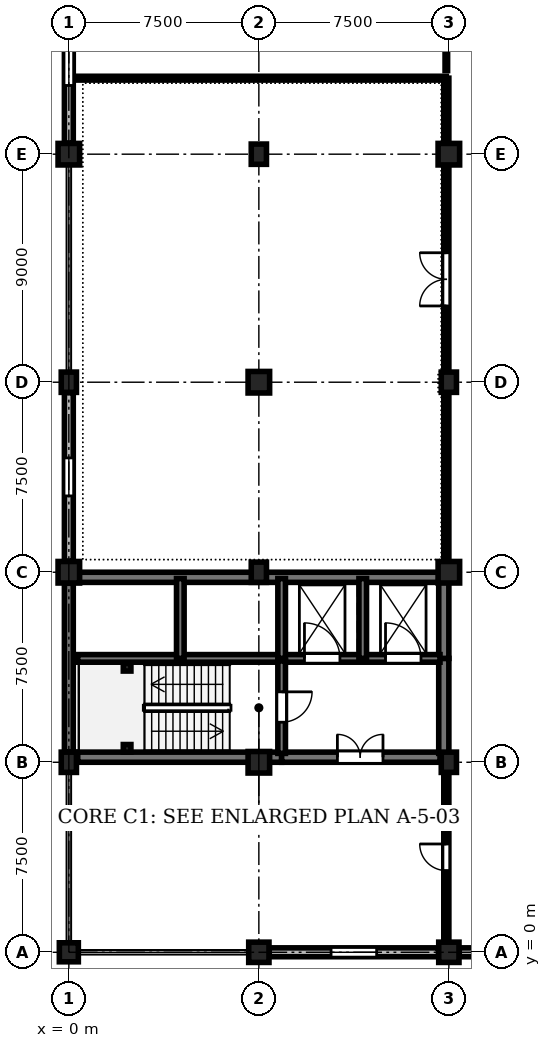
"""IFC4 building model, lengths in metres.
Left out: names, types, materials, properties, quantities, classifications, styles, units other than length and angle.
Written with IfcOpenShell. Run it as: python <this file> out.ifc"""

import sys

from ifc_helpers import new_model, si_unit, direction, frame, frame_2d, origin, origin_with_axes, origin_2d, place, context, subcontext, project, spatial, rectangle, circle, i_section, extrude, element, fill, save


model = new_model("IFC4")
c1 = context("Model", 3, precision=1e-05, world=origin(), true_north=direction((0.0, 1.0)))
c2 = subcontext(c1, "Body", "Model", "MODEL_VIEW")
j1 = project(units=[si_unit("LENGTHUNIT", "METRE"), si_unit("PLANEANGLEUNIT", "RADIAN")], contexts=[c1])
p1 = place(None, origin())
s1 = spatial("IfcSite", under=j1, at=p1, CompositionType="ELEMENT")
p2 = place(p1, origin())
s2 = spatial("IfcBuilding", under=s1, at=p2, CompositionType="ELEMENT")
p3 = place(p2, frame((0.0, 0.0, 4.8)))
s3 = spatial("IfcBuildingStorey", under=s2, at=p3, CompositionType="ELEMENT", Elevation=4.8)
p4 = place(p3, origin_with_axes())
e1 = element("IfcColumn", 1, at=p4, inside=s3, PredefinedType="COLUMN", context=c2, shape_type="SweptSolid", body=[
    extrude(circle(Radius=0.375, at=origin_2d()), origin(), (0.0, 0.0, 1.0), 4.5),
])
p5 = place(p3, frame((0.0, 7.5, 0.0), z_axis=(0.0, 0.0, 1.0), x_axis=(1.0, 0.0, 0.0)))
e2 = element("IfcColumn", 2, at=p5, inside=s3, PredefinedType="COLUMN", context=c2, shape_type="SweptSolid", body=[
    extrude(rectangle(XDim=0.6, YDim=0.8, at=origin_2d()), origin(), (0.0, 0.0, 1.0), 4.5),
])
p6 = place(p3, frame((0.0, 15.0, 0.0), z_axis=(0.0, 0.0, 1.0), x_axis=(1.0, 0.0, 0.0)))
e3 = element("IfcColumn", 3, at=p6, inside=s3, PredefinedType="COLUMN", context=c2, shape_type="SweptSolid", body=[
    extrude(rectangle(XDim=0.85, YDim=0.85, at=origin_2d()), origin(), (0.0, 0.0, 1.0), 4.5),
])
p7 = place(p3, frame((0.0, 22.5, 0.0), z_axis=(0.0, 0.0, 1.0), x_axis=(1.0, 0.0, 0.0)))
e4 = element("IfcColumn", 4, at=p7, inside=s3, PredefinedType="COLUMN", context=c2, shape_type="SweptSolid", body=[
    extrude(rectangle(XDim=0.6, YDim=0.8, at=origin_2d()), origin(), (0.0, 0.0, 1.0), 4.5),
])
p8 = place(p3, frame((0.0, 31.5, 0.0), z_axis=(0.0, 0.0, 1.0), x_axis=(1.0, 0.0, 0.0)))
e5 = element("IfcColumn", 5, at=p8, inside=s3, PredefinedType="COLUMN", context=c2, shape_type="SweptSolid", body=[
    extrude(rectangle(XDim=0.85, YDim=0.85, at=origin_2d()), origin(), (0.0, 0.0, 1.0), 4.5),
])
p9 = place(p3, frame((7.5, 0.0, 0.0), z_axis=(0.0, 0.0, 1.0), x_axis=(1.0, 0.0, 0.0)))
e6 = element("IfcColumn", 6, at=p9, inside=s3, PredefinedType="COLUMN", context=c2, shape_type="SweptSolid", body=[
    extrude(rectangle(XDim=0.8, YDim=0.8, at=origin_2d()), origin(), (0.0, 0.0, 1.0), 4.5),
])
p10 = place(p3, frame((7.5, 7.5, 0.0), z_axis=(0.0, 0.0, 1.0), x_axis=(1.0, 0.0, 0.0)))
e7 = element("IfcColumn", 7, at=p10, inside=s3, PredefinedType="COLUMN", context=c2, shape_type="SweptSolid", body=[
    extrude(rectangle(XDim=0.85, YDim=0.85, at=origin_2d()), origin(), (0.0, 0.0, 1.0), 4.5),
])
p11 = place(p3, frame((7.5, 15.0, 0.0), z_axis=(0.0, 0.0, 1.0), x_axis=(1.0, 0.0, 0.0)))
e8 = element("IfcColumn", 8, at=p11, inside=s3, PredefinedType="COLUMN", context=c2, shape_type="SweptSolid", body=[
    extrude(rectangle(XDim=0.6, YDim=0.8, at=origin_2d()), origin(), (0.0, 0.0, 1.0), 4.5),
])
p12 = place(p3, frame((7.5, 22.5, 0.0), z_axis=(0.0, 0.0, 1.0), x_axis=(1.0, 0.0, 0.0)))
e9 = element("IfcColumn", 9, at=p12, inside=s3, PredefinedType="COLUMN", context=c2, shape_type="SweptSolid", body=[
    extrude(rectangle(XDim=0.85, YDim=0.85, at=origin_2d()), origin(), (0.0, 0.0, 1.0), 4.5),
])
p13 = place(p3, frame((7.5, 31.5, 0.0), z_axis=(0.0, 0.0, 1.0), x_axis=(1.0, 0.0, 0.0)))
e10 = element("IfcColumn", 10, at=p13, inside=s3, PredefinedType="COLUMN", context=c2, shape_type="SweptSolid", body=[
    extrude(rectangle(XDim=0.6, YDim=0.8, at=origin_2d()), origin(), (0.0, 0.0, 1.0), 4.5),
])
p14 = place(p3, frame((15.0, 0.0, 0.0), z_axis=(0.0, 0.0, 1.0), x_axis=(1.0, 0.0, 0.0)))
e11 = element("IfcColumn", 11, at=p14, inside=s3, PredefinedType="COLUMN", context=c2, shape_type="SweptSolid", body=[
    extrude(rectangle(XDim=0.8, YDim=0.8, at=origin_2d()), origin(), (0.0, 0.0, 1.0), 4.5),
])
p15 = place(p3, frame((15.0, 7.5, 0.0), z_axis=(0.0, 0.0, 1.0), x_axis=(1.0, 0.0, 0.0)))
e12 = element("IfcColumn", 12, at=p15, inside=s3, PredefinedType="COLUMN", context=c2, shape_type="SweptSolid", body=[
    extrude(rectangle(XDim=0.6, YDim=0.8, at=origin_2d()), origin(), (0.0, 0.0, 1.0), 4.5),
])
p16 = place(p3, frame((15.0, 15.0, 0.0), z_axis=(0.0, 0.0, 1.0), x_axis=(1.0, 0.0, 0.0)))
e13 = element("IfcColumn", 13, at=p16, inside=s3, PredefinedType="COLUMN", context=c2, shape_type="SweptSolid", body=[
    extrude(rectangle(XDim=0.85, YDim=0.85, at=origin_2d()), origin(), (0.0, 0.0, 1.0), 4.5),
])
p17 = place(p3, frame((15.0, 22.5, 0.0), z_axis=(0.0, 0.0, 1.0), x_axis=(1.0, 0.0, 0.0)))
e14 = element("IfcColumn", 14, at=p17, inside=s3, PredefinedType="COLUMN", context=c2, shape_type="SweptSolid", body=[
    extrude(rectangle(XDim=0.6, YDim=0.8, at=origin_2d()), origin(), (0.0, 0.0, 1.0), 4.5),
])
p18 = place(p3, frame((15.0, 31.5, 0.0), z_axis=(0.0, 0.0, 1.0), x_axis=(1.0, 0.0, 0.0)))
e15 = element("IfcColumn", 15, at=p18, inside=s3, PredefinedType="COLUMN", context=c2, shape_type="SweptSolid", body=[
    extrude(rectangle(XDim=0.85, YDim=0.85, at=origin_2d()), origin(), (0.0, 0.0, 1.0), 4.5),
])
for number, where, z_axis, x_axis in (
    (16, (2.3, 8.05, 0.0), (0.0, 0.0, 1.0), (1.0, 0.0, 0.0)),
    (17, (2.3, 11.25, 0.0), (0.0, 0.0, 1.0), (1.0, 0.0, 0.0)),
):
    element("IfcColumn", number, at=place(p3, frame(where, z_axis=z_axis, x_axis=x_axis)), inside=s3, PredefinedType="COLUMN", context=c2, shape_type="SweptSolid", body=[
        extrude(i_section(OverallWidth=0.3, OverallDepth=0.3, WebThickness=0.011, FlangeThickness=0.019, FilletRadius=0.027, at=origin_2d()), origin(), (0.0, 0.0, 1.0), 4.5),
    ])
p19 = place(p3, frame((0.0, 7.91, 0.0), z_axis=(0.0, 0.0, 1.0), x_axis=(0.0, 1.0, 0.0)))
e18 = element("IfcWall", 18, at=p19, inside=s3, PredefinedType="SHEAR", context=c2, shape_type="SweptSolid", body=[
    extrude(rectangle(XDim=6.655, YDim=0.35, at=frame_2d((3.328, 0.0))), origin(), (0.0, 0.0, 1.0), 4.18),
])
p20 = place(p3, frame((0.0, 15.435, 0.0), z_axis=(0.0, 0.0, 1.0), x_axis=(0.0, 1.0, 0.0)))
e19 = element("IfcWall", 19, at=p20, inside=s3, PredefinedType="STANDARD", context=c2, shape_type="SweptSolid", body=[
    extrude(rectangle(XDim=6.655, YDim=0.35, at=frame_2d((3.328, 0.0))), origin(), (0.0, 0.0, 1.0), 3.63),
])
p21 = place(p20, frame((2.577, 0.0, 0.9)))
e20 = element("IfcOpeningElement", 20, at=p21, cuts=e19, PredefinedType="OPENING", context=c2, shape_type="SweptSolid", body=[
    extrude(rectangle(XDim=1.5, YDim=2.1, at=frame_2d((0.75, 1.05))), frame((0.0, 0.185, 0.0), z_axis=(0.0, -1.0, 0.0), x_axis=(1.0, 0.0, 0.0)), (0.0, 0.0, 1.0), 0.37),
])
p22 = place(p3, frame((0.0, 31.935, 0.0), z_axis=(0.0, 0.0, 1.0), x_axis=(0.0, 1.0, 0.0)))
e21 = element("IfcWall", 21, at=p22, inside=s3, PredefinedType="STANDARD", context=c2, shape_type="SweptSolid", body=[
    extrude(rectangle(XDim=6.655, YDim=0.35, at=frame_2d((3.328, 0.0))), origin(), (0.0, 0.0, 1.0), 3.63),
])
p23 = place(p22, frame((2.278, 0.0, 0.9)))
e22 = element("IfcOpeningElement", 22, at=p23, cuts=e21, PredefinedType="OPENING", context=c2, shape_type="SweptSolid", body=[
    extrude(rectangle(XDim=2.1, YDim=2.1, at=frame_2d((1.05, 1.05))), frame((0.0, 0.185, 0.0), z_axis=(0.0, -1.0, 0.0), x_axis=(1.0, 0.0, 0.0)), (0.0, 0.0, 1.0), 0.37),
])
p24 = place(p3, frame((14.59, 0.0, 0.0), z_axis=(0.0, 0.0, 1.0), x_axis=(-1.0, 0.0, 0.0)))
e23 = element("IfcWall", 23, at=p24, inside=s3, PredefinedType="STANDARD", context=c2, shape_type="SweptSolid", body=[
    extrude(rectangle(XDim=6.68, YDim=0.35, at=frame_2d((3.34, 0.0))), origin(), (0.0, 0.0, 1.0), 3.63),
])
p25 = place(p24, frame((2.44, 0.0, 0.9)))
e24 = element("IfcOpeningElement", 24, at=p25, cuts=e23, PredefinedType="OPENING", context=c2, shape_type="SweptSolid", body=[
    extrude(rectangle(XDim=1.8, YDim=2.1, at=frame_2d((0.9, 1.05))), frame((0.0, 0.185, 0.0), z_axis=(0.0, -1.0, 0.0), x_axis=(1.0, 0.0, 0.0)), (0.0, 0.0, 1.0), 0.37),
])
p26 = place(p3, frame((22.115, 0.0, 0.0), z_axis=(0.0, 0.0, 1.0), x_axis=(-1.0, 0.0, 0.0)))
e25 = element("IfcWall", 25, at=p26, inside=s3, PredefinedType="STANDARD", context=c2, shape_type="SweptSolid", body=[
    extrude(rectangle(XDim=6.705, YDim=0.35, at=frame_2d((3.353, 0.0))), origin(), (0.0, 0.0, 1.0), 3.63),
])
p27 = place(p26, frame((2.603, 0.0, 0.9)))
e26 = element("IfcOpeningElement", 26, at=p27, cuts=e25, PredefinedType="OPENING", context=c2, shape_type="SweptSolid", body=[
    extrude(rectangle(XDim=1.5, YDim=2.1, at=frame_2d((0.75, 1.05))), frame((0.0, 0.185, 0.0), z_axis=(0.0, -1.0, 0.0), x_axis=(1.0, 0.0, 0.0)), (0.0, 0.0, 1.0), 0.37),
])
p28 = place(p3, frame((0.35, 7.7, 0.0), z_axis=(0.0, 0.0, 1.0), x_axis=(1.0, 0.0, 0.0)))
e27 = element("IfcWall", 27, at=p28, inside=s3, PredefinedType="SHEAR", context=c2, shape_type="SweptSolid", body=[
    extrude(rectangle(XDim=8.05, YDim=0.4, at=frame_2d((4.025, 0.0))), origin(), (0.0, 0.0, 1.0), 4.18),
])
p29 = place(p3, frame((8.4, 7.7, 0.0), z_axis=(0.0, 0.0, 1.0), x_axis=(1.0, 0.0, 0.0)))
e28 = element("IfcWall", 28, at=p29, inside=s3, PredefinedType="SHEAR", context=c2, shape_type="SweptSolid", body=[
    extrude(rectangle(XDim=6.25, YDim=0.4, at=frame_2d((3.125, 0.0))), origin(), (0.0, 0.0, 1.0), 4.18),
])
p30 = place(p29, frame((2.2, 0.0, 0.0)))
e29 = element("IfcOpeningElement", 29, at=p30, cuts=e28, PredefinedType="OPENING", context=c2, shape_type="SweptSolid", body=[
    extrude(rectangle(XDim=1.8, YDim=2.25, at=frame_2d((0.9, 1.125))), frame((0.0, 0.21, 0.0), z_axis=(0.0, -1.0, 0.0), x_axis=(1.0, 0.0, 0.0)), (0.0, 0.0, 1.0), 0.42),
])
p31 = place(p3, frame((0.35, 14.8, 0.0), z_axis=(0.0, 0.0, 1.0), x_axis=(1.0, 0.0, 0.0)))
e30 = element("IfcWall", 30, at=p31, inside=s3, PredefinedType="SHEAR", context=c2, shape_type="SweptSolid", body=[
    extrude(rectangle(XDim=14.3, YDim=0.4, at=frame_2d((7.15, 0.0))), origin(), (0.0, 0.0, 1.0), 4.18),
])
p32 = place(p3, frame((14.8, 7.85, 0.0), z_axis=(0.0, 0.0, 1.0), x_axis=(0.0, 1.0, 0.0)))
e31 = element("IfcWall", 31, at=p32, inside=s3, PredefinedType="SHEAR", context=c2, shape_type="SweptSolid", body=[
    extrude(rectangle(XDim=3.75, YDim=0.4, at=frame_2d((1.875, 0.0))), origin(), (0.0, 0.0, 1.0), 4.18),
])
p33 = place(p3, frame((14.8, 11.6, 0.0), z_axis=(0.0, 0.0, 1.0), x_axis=(0.0, 1.0, 0.0)))
e32 = element("IfcWall", 32, at=p33, inside=s3, PredefinedType="SHEAR", context=c2, shape_type="SweptSolid", body=[
    extrude(rectangle(XDim=3.05, YDim=0.4, at=frame_2d((1.525, 0.0))), origin(), (0.0, 0.0, 1.0), 4.18),
])
p34 = place(p3, frame((0.35, 11.6, 0.0), z_axis=(0.0, 0.0, 1.0), x_axis=(1.0, 0.0, 0.0)))
e33 = element("IfcWall", 33, at=p34, inside=s3, PredefinedType="SHEAR", context=c2, shape_type="SweptSolid", body=[
    extrude(rectangle(XDim=8.05, YDim=0.3, at=frame_2d((4.025, 0.0))), origin(), (0.0, 0.0, 1.0), 4.18),
])
p35 = place(p3, frame((8.4, 11.6, 0.0), z_axis=(0.0, 0.0, 1.0), x_axis=(1.0, 0.0, 0.0)))
e34 = element("IfcWall", 34, at=p35, inside=s3, PredefinedType="SHEAR", context=c2, shape_type="SweptSolid", body=[
    extrude(rectangle(XDim=6.25, YDim=0.3, at=frame_2d((3.125, 0.0))), origin(), (0.0, 0.0, 1.0), 4.18),
])
p36 = place(p35, frame((0.9, 0.0, 0.0)))
e35 = element("IfcOpeningElement", 35, at=p36, cuts=e34, PredefinedType="OPENING", context=c2, shape_type="SweptSolid", body=[
    extrude(rectangle(XDim=1.4, YDim=2.25, at=frame_2d((0.7, 1.125))), frame((0.0, 0.16, 0.0), z_axis=(0.0, -1.0, 0.0), x_axis=(1.0, 0.0, 0.0)), (0.0, 0.0, 1.0), 0.32),
])
p37 = place(p35, frame((4.1, 0.0, 0.0)))
e36 = element("IfcOpeningElement", 36, at=p37, cuts=e34, PredefinedType="OPENING", context=c2, shape_type="SweptSolid", body=[
    extrude(rectangle(XDim=1.4, YDim=2.25, at=frame_2d((0.7, 1.125))), frame((0.0, 0.16, 0.0), z_axis=(0.0, -1.0, 0.0), x_axis=(1.0, 0.0, 0.0)), (0.0, 0.0, 1.0), 0.32),
])
p38 = place(p3, frame((8.4, 11.5, 0.0), z_axis=(0.0, 0.0, 1.0), x_axis=(0.0, -1.0, 0.0)))
e37 = element("IfcWall", 37, at=p38, inside=s3, PredefinedType="SHEAR", context=c2, shape_type="SweptSolid", body=[
    extrude(rectangle(XDim=3.65, YDim=0.3, at=frame_2d((1.825, 0.0))), origin(), (0.0, 0.0, 1.0), 4.18),
])
p39 = place(p38, frame((1.22, 0.0, 0.0)))
e38 = element("IfcOpeningElement", 38, at=p39, cuts=e37, PredefinedType="OPENING", context=c2, shape_type="SweptSolid", body=[
    extrude(rectangle(XDim=1.2, YDim=2.25, at=frame_2d((0.6, 1.125))), frame((0.0, 0.16, 0.0), z_axis=(0.0, -1.0, 0.0), x_axis=(1.0, 0.0, 0.0)), (0.0, 0.0, 1.0), 0.32),
])
for number, where, z_axis, x_axis in (
    (39, (4.4, 11.6, 0.0), (0.0, 0.0, 1.0), (0.0, 1.0, 0.0)),
    (40, (8.4, 11.6, 0.0), (0.0, 0.0, 1.0), (0.0, 1.0, 0.0)),
    (41, (11.6, 11.6, 0.0), (0.0, 0.0, 1.0), (0.0, 1.0, 0.0)),
):
    element("IfcWall", number, at=place(p3, frame(where, z_axis=z_axis, x_axis=x_axis)), inside=s3, PredefinedType="SHEAR", context=c2, shape_type="SweptSolid", body=[
        extrude(rectangle(XDim=3.15, YDim=0.3, at=frame_2d((1.575, 0.0))), origin(), (0.0, 0.0, 1.0), 4.18),
    ])
p40 = place(p3, frame((14.9, 15.3, 0.0), z_axis=(0.0, 0.0, 1.0), x_axis=(0.0, 1.0, 0.0)))
e42 = element("IfcWall", 42, at=p40, inside=s3, PredefinedType="STANDARD", context=c2, shape_type="SweptSolid", body=[
    extrude(rectangle(XDim=19.2, YDim=0.2, at=frame_2d((9.6, 0.0))), origin(), (0.0, 0.0, 1.0), 3.465),
])
p41 = place(p40, frame((10.21, 0.0, 0.0)))
e43 = element("IfcOpeningElement", 43, at=p41, cuts=e42, PredefinedType="OPENING", context=c2, shape_type="SweptSolid", body=[
    extrude(rectangle(XDim=2.1, YDim=2.4, at=frame_2d((1.05, 1.2))), frame((0.0, 0.11, 0.0), z_axis=(0.0, -1.0, 0.0), x_axis=(1.0, 0.0, 0.0)), (0.0, 0.0, 1.0), 0.22),
])
p42 = place(p3, frame((14.9, 34.8, 0.0), z_axis=(0.0, 0.0, 1.0), x_axis=(0.0, 1.0, 0.0)))
e44 = element("IfcWall", 44, at=p42, inside=s3, PredefinedType="PARTITIONING", context=c2, shape_type="SweptSolid", body=[
    extrude(rectangle(XDim=18.9, YDim=0.1, at=frame_2d((9.45, 0.0))), origin(), (0.0, 0.0, 1.0), 3.565),
])
p43 = place(p42, frame((7.19, 0.0, 0.0)))
e45 = element("IfcOpeningElement", 45, at=p43, cuts=e44, PredefinedType="OPENING", context=c2, shape_type="SweptSolid", body=[
    extrude(rectangle(XDim=1.05, YDim=2.2, at=frame_2d((0.525, 1.1))), frame((0.0, 0.06, 0.0), z_axis=(0.0, -1.0, 0.0), x_axis=(1.0, 0.0, 0.0)), (0.0, 0.0, 1.0), 0.12),
])
p44 = place(p3, frame((14.9, 0.35, 0.0), z_axis=(0.0, 0.0, 1.0), x_axis=(0.0, 1.0, 0.0)))
e46 = element("IfcWall", 46, at=p44, inside=s3, PredefinedType="STANDARD", context=c2, shape_type="SweptSolid", body=[
    extrude(rectangle(XDim=6.8, YDim=0.2, at=frame_2d((3.4, 0.0))), origin(), (0.0, 0.0, 1.0), 3.565),
])
p45 = place(p44, frame((2.875, 0.0, 0.0)))
e47 = element("IfcOpeningElement", 47, at=p45, cuts=e46, PredefinedType="OPENING", context=c2, shape_type="SweptSolid", body=[
    extrude(rectangle(XDim=1.05, YDim=2.2, at=frame_2d((0.525, 1.1))), frame((0.0, 0.11, 0.0), z_axis=(0.0, -1.0, 0.0), x_axis=(1.0, 0.0, 0.0)), (0.0, 0.0, 1.0), 0.22),
])
p46 = place(p3, frame((0.35, 34.5, 0.0), z_axis=(0.0, 0.0, 1.0), x_axis=(1.0, 0.0, 0.0)))
e48 = element("IfcWall", 48, at=p46, inside=s3, PredefinedType="PARTITIONING", context=c2, shape_type="SweptSolid", body=[
    extrude(rectangle(XDim=14.55, YDim=0.15, at=frame_2d((7.275, 0.0))), origin(), (0.0, 0.0, 1.0), 4.165),
])
p47 = place(p21, origin())
e49 = element("IfcWindow", 49, at=p47, inside=s3, PartitioningType="SINGLE_PANEL", PredefinedType="WINDOW", context=c2, shape_type="SweptSolid", body=[
    extrude(rectangle(XDim=1.5, YDim=2.1, at=frame_2d((0.75, 1.05))), frame((0.0, 0.03, 0.0), z_axis=(0.0, -1.0, 0.0), x_axis=(1.0, 0.0, 0.0)), (0.0, 0.0, 1.0), 0.06),
])
fill(e20, e49)
p48 = place(p23, origin())
e50 = element("IfcWindow", 50, at=p48, inside=s3, PartitioningType="SINGLE_PANEL", PredefinedType="WINDOW", context=c2, shape_type="SweptSolid", body=[
    extrude(rectangle(XDim=2.1, YDim=2.1, at=frame_2d((1.05, 1.05))), frame((0.0, 0.03, 0.0), z_axis=(0.0, -1.0, 0.0), x_axis=(1.0, 0.0, 0.0)), (0.0, 0.0, 1.0), 0.06),
])
fill(e22, e50)
p49 = place(p25, origin())
e51 = element("IfcWindow", 51, at=p49, inside=s3, PartitioningType="SINGLE_PANEL", PredefinedType="WINDOW", context=c2, shape_type="SweptSolid", body=[
    extrude(rectangle(XDim=1.8, YDim=2.1, at=frame_2d((0.9, 1.05))), frame((0.0, 0.03, 0.0), z_axis=(0.0, -1.0, 0.0), x_axis=(1.0, 0.0, 0.0)), (0.0, 0.0, 1.0), 0.06),
])
fill(e24, e51)
p50 = place(p30, origin())
e52 = element("IfcDoor", 52, at=p50, inside=s3, OperationType="DOUBLE_DOOR_SINGLE_SWING", PredefinedType="DOOR", context=c2, shape_type="SweptSolid", body=[
    extrude(rectangle(XDim=1.8, YDim=2.25, at=frame_2d((0.9, 1.125))), frame((0.0, 0.025, 0.0), z_axis=(0.0, -1.0, 0.0), x_axis=(1.0, 0.0, 0.0)), (0.0, 0.0, 1.0), 0.05),
])
fill(e29, e52)
p51 = place(p36, origin())
e53 = element("IfcDoor", 53, at=p51, inside=s3, OperationType="DOUBLE_DOOR_SLIDING", PredefinedType="DOOR", context=c2, shape_type="SweptSolid", body=[
    extrude(rectangle(XDim=1.4, YDim=2.25, at=frame_2d((0.7, 1.125))), frame((0.0, 0.025, 0.0), z_axis=(0.0, -1.0, 0.0), x_axis=(1.0, 0.0, 0.0)), (0.0, 0.0, 1.0), 0.05),
])
fill(e35, e53)
p52 = place(p37, origin())
e54 = element("IfcDoor", 54, at=p52, inside=s3, OperationType="DOUBLE_DOOR_SLIDING", PredefinedType="DOOR", context=c2, shape_type="SweptSolid", body=[
    extrude(rectangle(XDim=1.4, YDim=2.25, at=frame_2d((0.7, 1.125))), frame((0.0, 0.025, 0.0), z_axis=(0.0, -1.0, 0.0), x_axis=(1.0, 0.0, 0.0)), (0.0, 0.0, 1.0), 0.05),
])
fill(e36, e54)
p53 = place(p39, origin())
e55 = element("IfcDoor", 55, at=p53, inside=s3, OperationType="SINGLE_SWING_LEFT", PredefinedType="DOOR", context=c2, shape_type="SweptSolid", body=[
    extrude(rectangle(XDim=1.2, YDim=2.25, at=frame_2d((0.6, 1.125))), frame((0.0, 0.025, 0.0), z_axis=(0.0, -1.0, 0.0), x_axis=(1.0, 0.0, 0.0)), (0.0, 0.0, 1.0), 0.05),
])
fill(e38, e55)
p54 = place(p41, origin())
e56 = element("IfcDoor", 56, at=p54, inside=s3, OperationType="DOUBLE_DOOR_SINGLE_SWING", PredefinedType="DOOR", context=c2, shape_type="SweptSolid", body=[
    extrude(rectangle(XDim=2.1, YDim=2.4, at=frame_2d((1.05, 1.2))), frame((0.0, 0.025, 0.0), z_axis=(0.0, -1.0, 0.0), x_axis=(1.0, 0.0, 0.0)), (0.0, 0.0, 1.0), 0.05),
])
fill(e43, e56)
p55 = place(p45, origin())
e57 = element("IfcDoor", 57, at=p55, inside=s3, OperationType="SINGLE_SWING_RIGHT", PredefinedType="DOOR", context=c2, shape_type="SweptSolid", body=[
    extrude(rectangle(XDim=1.05, YDim=2.2, at=frame_2d((0.525, 1.1))), frame((0.0, 0.025, 0.0), z_axis=(0.0, -1.0, 0.0), x_axis=(1.0, 0.0, 0.0)), (0.0, 0.0, 1.0), 0.05),
])
fill(e47, e57)
save(model, sys.argv[1])
